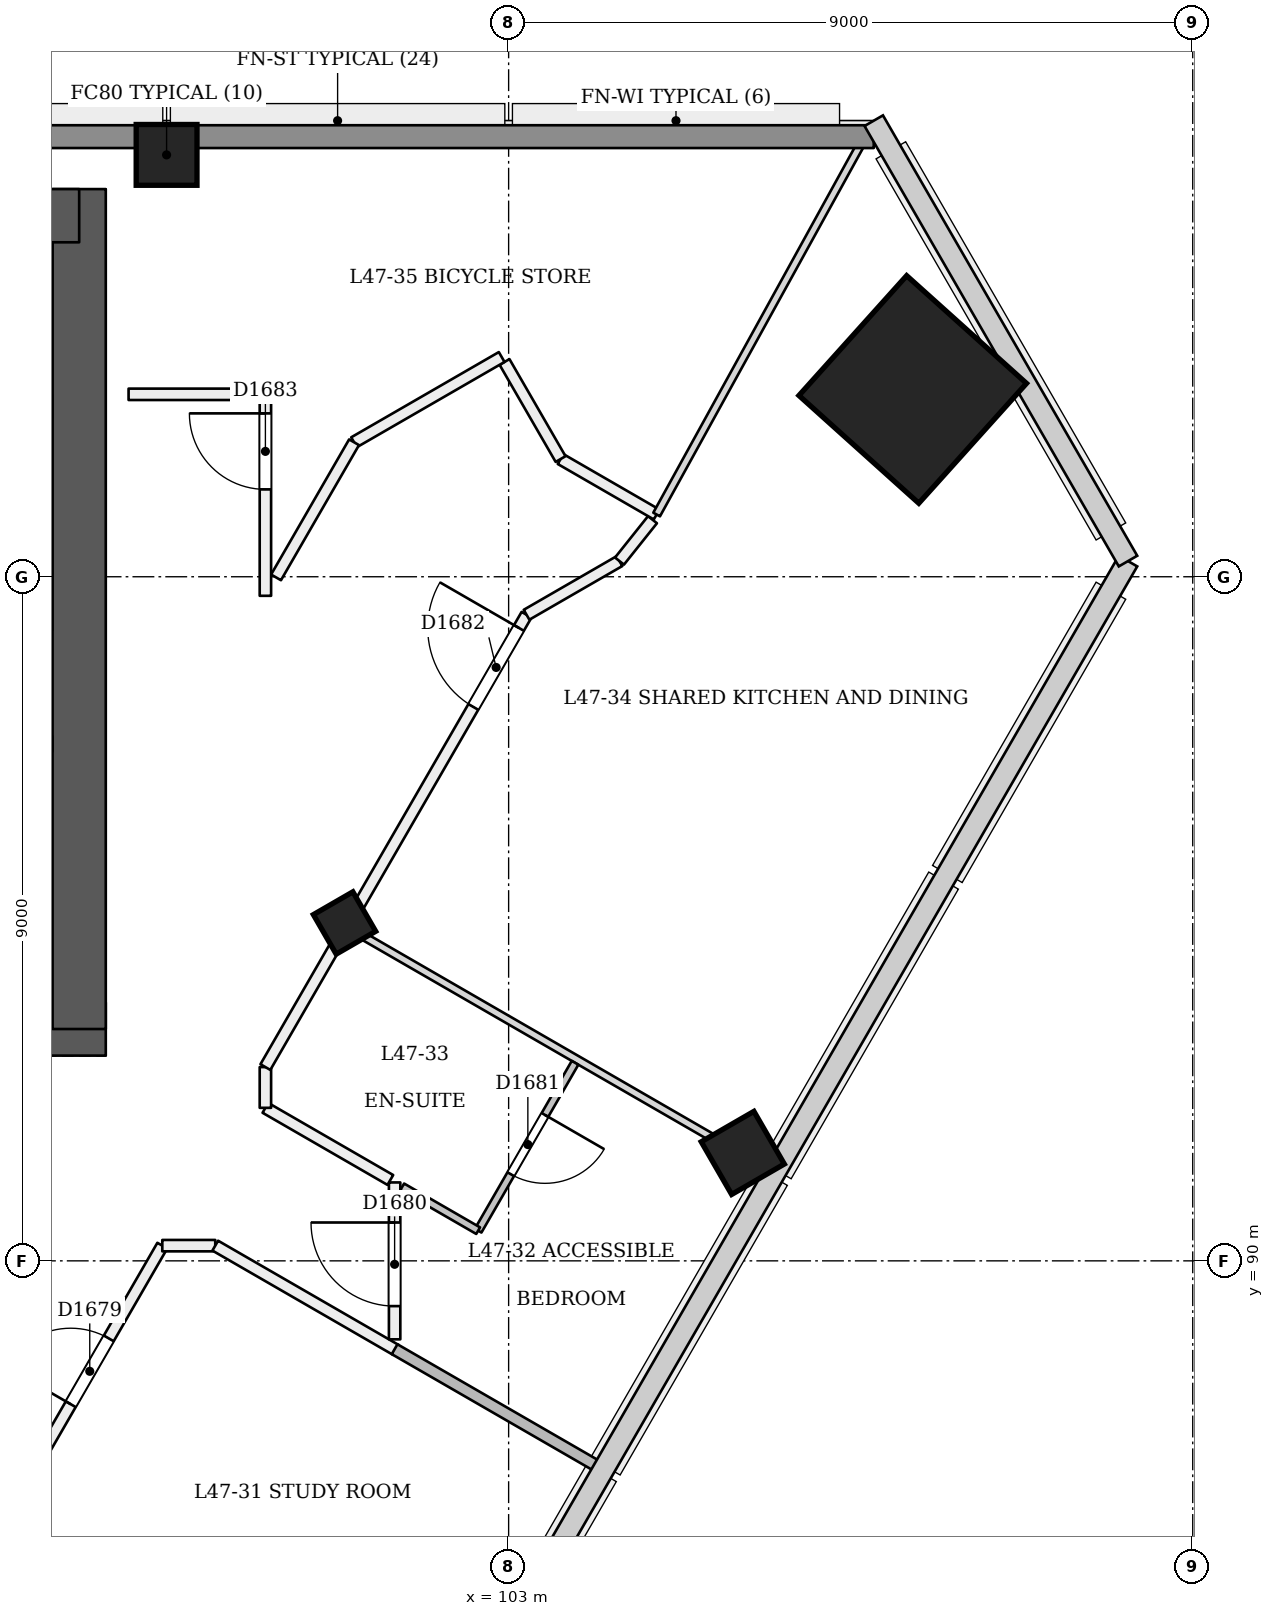
"""IFC4 building model, lengths in metres.
Left out: names, types, materials, properties, quantities, classifications, styles, units other than length and angle.
Written with IfcOpenShell. Run it as: python <this file> out.ifc"""

import sys

from ifc_helpers import new_model, si_unit, direction, frame, frame_2d, origin, origin_2d, place, context, subcontext, project, spatial, rectangle, extrude, element, fill, save


model = new_model("IFC4")
c1 = context("Model", 3, precision=1e-05, world=origin(), true_north=direction((0.0, 1.0)))
c2 = subcontext(c1, "Body", "Model", "MODEL_VIEW")
j1 = project(units=[si_unit("LENGTHUNIT", "METRE"), si_unit("PLANEANGLEUNIT", "RADIAN")], contexts=[c1])
p1 = place(None, origin())
s1 = spatial("IfcSite", under=j1, at=p1, CompositionType="ELEMENT")
p2 = place(p1, origin())
s2 = spatial("IfcBuilding", under=s1, at=p2, CompositionType="ELEMENT")
p3 = place(p2, frame((0.0, 0.0, 181.8)))
s3 = spatial("IfcBuildingStorey", under=s2, at=p3, CompositionType="ELEMENT", Elevation=181.8)
p4 = place(p3, frame((72.65, 93.05, 0.0), z_axis=(0.0, 0.0, 1.0), x_axis=(1.0, 0.0, 0.0)))
e1 = element("IfcWall", 1, at=p4, inside=s3, PredefinedType="SHEAR", context=c2, shape_type="SweptSolid", body=[
    extrude(rectangle(XDim=25.05, YDim=0.7, at=frame_2d((12.525, 0.0))), origin(), (0.0, 0.0, 1.0), 3.6),
])
p5 = place(p4, frame((1.15, 0.0, 0.0)))
e2 = element("IfcOpeningElement", 2, at=p5, cuts=e1, PredefinedType="OPENING", context=c2, shape_type="SweptSolid", body=[
    extrude(rectangle(XDim=1.2, YDim=2.1, at=frame_2d((0.6, 1.05))), frame((0.0, 0.36, 0.0), z_axis=(0.0, -1.0, 0.0), x_axis=(1.0, 0.0, 0.0)), (0.0, 0.0, 1.0), 0.721),
])
p6 = place(p4, frame((3.35, 0.0, 0.0)))
e3 = element("IfcOpeningElement", 3, at=p6, cuts=e1, PredefinedType="OPENING", context=c2, shape_type="SweptSolid", body=[
    extrude(rectangle(XDim=1.2, YDim=2.1, at=frame_2d((0.6, 1.05))), frame((0.0, 0.36, 0.0), z_axis=(0.0, -1.0, 0.0), x_axis=(1.0, 0.0, 0.0)), (0.0, 0.0, 1.0), 0.721),
])
p7 = place(p4, frame((13.35, 0.0, 0.0)))
e4 = element("IfcOpeningElement", 4, at=p7, cuts=e1, PredefinedType="OPENING", context=c2, shape_type="SweptSolid", body=[
    extrude(rectangle(XDim=1.2, YDim=2.1, at=frame_2d((0.6, 1.05))), frame((0.0, 0.36, 0.0), z_axis=(0.0, -1.0, 0.0), x_axis=(1.0, 0.0, 0.0)), (0.0, 0.0, 1.0), 0.721),
])
p8 = place(p4, frame((15.312, 0.0, 0.0)))
e5 = element("IfcOpeningElement", 5, at=p8, cuts=e1, PredefinedType="OPENING", context=c2, shape_type="SweptSolid", body=[
    extrude(rectangle(XDim=1.0, YDim=2.1, at=frame_2d((0.5, 1.05))), frame((0.0, 0.36, 0.0), z_axis=(0.0, -1.0, 0.0), x_axis=(1.0, 0.0, 0.0)), (0.0, 0.0, 1.0), 0.721),
])
p9 = place(p4, frame((18.15, 0.0, 0.0)))
e6 = element("IfcOpeningElement", 6, at=p9, cuts=e1, PredefinedType="OPENING", context=c2, shape_type="SweptSolid", body=[
    extrude(rectangle(XDim=1.0, YDim=2.1, at=frame_2d((0.5, 1.05))), frame((0.0, 0.36, 0.0), z_axis=(0.0, -1.0, 0.0), x_axis=(1.0, 0.0, 0.0)), (0.0, 0.0, 1.0), 0.721),
])
p10 = place(p4, frame((21.05, 0.0, 0.0)))
e7 = element("IfcOpeningElement", 7, at=p10, cuts=e1, PredefinedType="OPENING", context=c2, shape_type="SweptSolid", body=[
    extrude(rectangle(XDim=1.0, YDim=2.1, at=frame_2d((0.5, 1.05))), frame((0.0, 0.36, 0.0), z_axis=(0.0, -1.0, 0.0), x_axis=(1.0, 0.0, 0.0)), (0.0, 0.0, 1.0), 0.721),
])
p11 = place(p4, frame((22.938, 0.0, 0.0)))
e8 = element("IfcOpeningElement", 8, at=p11, cuts=e1, PredefinedType="OPENING", context=c2, shape_type="SweptSolid", body=[
    extrude(rectangle(XDim=1.0, YDim=2.1, at=frame_2d((0.5, 1.05))), frame((0.0, 0.36, 0.0), z_axis=(0.0, -1.0, 0.0), x_axis=(1.0, 0.0, 0.0)), (0.0, 0.0, 1.0), 0.721),
])
p12 = place(p3, frame((97.35, 93.05, 0.0), z_axis=(0.0, 0.0, 1.0), x_axis=(0.0, 1.0, 0.0)))
e9 = element("IfcWall", 9, at=p12, inside=s3, PredefinedType="SHEAR", context=c2, shape_type="SweptSolid", body=[
    extrude(rectangle(XDim=11.05, YDim=0.7, at=frame_2d((5.525, 0.0))), origin(), (0.0, 0.0, 1.0), 3.6),
])
p13 = place(p3, frame((97.35, 103.75, 0.0), z_axis=(0.0, 0.0, 1.0), x_axis=(-1.0, 0.0, 0.0)))
e10 = element("IfcWall", 10, at=p13, inside=s3, PredefinedType="SHEAR", context=c2, shape_type="SweptSolid", body=[
    extrude(rectangle(XDim=25.05, YDim=0.7, at=frame_2d((12.525, 0.0))), origin(), (0.0, 0.0, 1.0), 3.6),
])
p14 = place(p3, frame((100.868, 94.398, -0.018), z_axis=(-0.02215369191, 0.038413282303, 0.999016333038), x_axis=(-0.500654723088, -0.865363077154, 0.022171895449)))
e11 = element("IfcColumn", 11, at=p14, inside=s3, PredefinedType="COLUMN", context=c2, shape_type="SweptSolid", body=[
    extrude(rectangle(XDim=0.6, YDim=0.6, at=origin_2d()), origin(), (0.0, 0.0, 1.0), 3.604),
])
p15 = place(p3, frame((108.35, 101.453, 0.0), z_axis=(-0.028403739082, 0.009219352065, 0.999554016126), x_axis=(0.500767468669, -0.865296834365, 0.022211050447)))
e12 = element("IfcColumn", 12, at=p15, inside=s3, PredefinedType="COLUMN", context=c2, shape_type="SweptSolid", body=[
    extrude(rectangle(XDim=2.12, YDim=2.12, at=origin_2d()), origin(), (0.0, 0.0, 1.0), 3.602),
])
p16 = place(p3, frame((98.5, 104.55, 0.0), z_axis=(0.0, 0.0, 1.0), x_axis=(1.0, 0.0, 0.0)))
e13 = element("IfcColumn", 13, at=p16, inside=s3, PredefinedType="COLUMN", context=c2, shape_type="SweptSolid", body=[
    extrude(rectangle(XDim=0.8, YDim=0.8, at=origin_2d()), origin(), (0.0, 0.0, 1.0), 3.6),
])
p17 = place(p3, frame((106.108, 91.373, -0.024), z_axis=(-0.02222134892, 0.038480872521, 0.999012229206), x_axis=(-0.500171903671, -0.86564104797, 0.022218074789)))
e14 = element("IfcColumn", 14, at=p17, inside=s3, PredefinedType="COLUMN", context=c2, shape_type="SweptSolid", body=[
    extrude(rectangle(XDim=0.8, YDim=0.8, at=origin_2d()), origin(), (0.0, 0.0, 1.0), 3.604),
])
p18 = place(p3, frame((85.033, 66.972, 0.0), z_axis=(0.0, 0.0, 1.0), x_axis=(0.500001115073, 0.866024759996, 0.0)))
e15 = element("IfcWall", 15, at=p18, inside=s3, PredefinedType="PARTITIONING", context=c2, shape_type="SweptSolid", body=[
    extrude(rectangle(XDim=26.822, YDim=0.15, at=frame_2d((13.411, 0.0))), origin(), (0.0, 0.0, 1.0), 2.75),
])
p19 = place(p18, frame((0.527, 0.0, 0.0)))
e16 = element("IfcOpeningElement", 16, at=p19, cuts=e15, PredefinedType="OPENING", context=c2, shape_type="SweptSolid", body=[
    extrude(rectangle(XDim=1.2, YDim=2.1, at=frame_2d((0.6, 1.05))), frame((0.0, 0.085, 0.0), z_axis=(0.0, -1.0, 0.0), x_axis=(1.0, 0.0, 0.0)), (0.0, 0.0, 1.0), 0.171),
])
p20 = place(p18, frame((7.566, 0.0, 0.0)))
e17 = element("IfcOpeningElement", 17, at=p20, cuts=e15, PredefinedType="OPENING", context=c2, shape_type="SweptSolid", body=[
    extrude(rectangle(XDim=1.0, YDim=2.1, at=frame_2d((0.5, 1.05))), frame((0.0, 0.085, 0.0), z_axis=(0.0, -1.0, 0.0), x_axis=(1.0, 0.0, 0.0)), (0.0, 0.0, 1.0), 0.171),
])
p21 = place(p18, frame((9.891, 0.0, 0.0)))
e18 = element("IfcOpeningElement", 18, at=p21, cuts=e15, PredefinedType="OPENING", context=c2, shape_type="SweptSolid", body=[
    extrude(rectangle(XDim=1.0, YDim=2.1, at=frame_2d((0.5, 1.05))), frame((0.0, 0.085, 0.0), z_axis=(0.0, -1.0, 0.0), x_axis=(1.0, 0.0, 0.0)), (0.0, 0.0, 1.0), 0.171),
])
p22 = place(p18, frame((16.45, 0.0, 0.0)))
e19 = element("IfcOpeningElement", 19, at=p22, cuts=e15, PredefinedType="OPENING", context=c2, shape_type="SweptSolid", body=[
    extrude(rectangle(XDim=1.0, YDim=2.1, at=frame_2d((0.5, 1.05))), frame((0.0, 0.085, 0.0), z_axis=(0.0, -1.0, 0.0), x_axis=(1.0, 0.0, 0.0)), (0.0, 0.0, 1.0), 0.171),
])
p23 = place(p18, frame((18.891, 0.0, 0.0)))
e20 = element("IfcOpeningElement", 20, at=p23, cuts=e15, PredefinedType="OPENING", context=c2, shape_type="SweptSolid", body=[
    extrude(rectangle(XDim=1.0, YDim=2.1, at=frame_2d((0.5, 1.05))), frame((0.0, 0.085, 0.0), z_axis=(0.0, -1.0, 0.0), x_axis=(1.0, 0.0, 0.0)), (0.0, 0.0, 1.0), 0.171),
])
p24 = place(p18, frame((24.413, 0.0, 0.0)))
e21 = element("IfcOpeningElement", 21, at=p24, cuts=e15, PredefinedType="OPENING", context=c2, shape_type="SweptSolid", body=[
    extrude(rectangle(XDim=1.0, YDim=2.1, at=frame_2d((0.5, 1.05))), frame((0.0, 0.085, 0.0), z_axis=(0.0, -1.0, 0.0), x_axis=(1.0, 0.0, 0.0)), (0.0, 0.0, 1.0), 0.171),
])
p25 = place(p3, frame((98.444, 90.2, 0.0), z_axis=(0.0, 0.0, 1.0), x_axis=(1.0, 0.0, 0.0)))
e22 = element("IfcWall", 22, at=p25, inside=s3, PredefinedType="PARTITIONING", context=c2, shape_type="SweptSolid", body=[
    extrude(rectangle(XDim=0.697, YDim=0.15, at=frame_2d((0.348, 0.0))), origin(), (0.0, 0.0, 1.0), 3.15),
])
p26 = place(p3, frame((99.14, 90.2, 0.0), z_axis=(0.0, 0.0, 1.0), x_axis=(0.866028570666, -0.499994514761, 0.0)))
e23 = element("IfcWall", 23, at=p26, inside=s3, PredefinedType="PARTITIONING", context=c2, shape_type="SweptSolid", body=[
    extrude(rectangle(XDim=2.745, YDim=0.15, at=frame_2d((1.372, 0.0))), origin(), (0.0, 0.0, 1.0), 3.15),
])
p27 = place(p3, frame((101.5, 88.968, 0.0), z_axis=(0.0, 0.0, 1.0), x_axis=(0.0, 1.0, 0.0)))
e24 = element("IfcWall", 24, at=p27, inside=s3, PredefinedType="PARTITIONING", context=c2, shape_type="SweptSolid", body=[
    extrude(rectangle(XDim=2.064, YDim=0.15, at=frame_2d((1.032, 0.0))), origin(), (0.0, 0.0, 1.0), 3.15),
])
p28 = place(p27, frame((0.437, 0.0, 0.0)))
e25 = element("IfcOpeningElement", 25, at=p28, cuts=e24, PredefinedType="OPENING", context=c2, shape_type="SweptSolid", body=[
    extrude(rectangle(XDim=1.1, YDim=2.1, at=frame_2d((0.55, 1.05))), frame((0.0, 0.085, 0.0), z_axis=(0.0, -1.0, 0.0), x_axis=(1.0, 0.0, 0.0)), (0.0, 0.0, 1.0), 0.171),
])
p29 = place(p3, frame((101.444, 91.064, 0.0), z_axis=(0.0, 0.0, 1.0), x_axis=(-0.866042076863, 0.499971120268, 0.0)))
e26 = element("IfcWall", 26, at=p29, inside=s3, PredefinedType="PARTITIONING", context=c2, shape_type="SweptSolid", body=[
    extrude(rectangle(XDim=1.898, YDim=0.15, at=frame_2d((0.949, 0.0))), origin(), (0.0, 0.0, 1.0), 3.15),
])
p30 = place(p3, frame((99.8, 92.013, 0.0), z_axis=(0.0, 0.0, 1.0), x_axis=(0.0, 1.0, 0.0)))
e27 = element("IfcWall", 27, at=p30, inside=s3, PredefinedType="PARTITIONING", context=c2, shape_type="SweptSolid", body=[
    extrude(rectangle(XDim=0.536, YDim=0.15, at=frame_2d((0.268, 0.0))), origin(), (0.0, 0.0, 1.0), 3.15),
])
p31 = place(p3, frame((99.8, 92.549, 0.0), z_axis=(0.0, 0.0, 1.0), x_axis=(0.49999106054, 0.866030564923, 0.0)))
e28 = element("IfcWall", 28, at=p31, inside=s3, PredefinedType="PARTITIONING", context=c2, shape_type="SweptSolid", body=[
    extrude(rectangle(XDim=6.871, YDim=0.15, at=frame_2d((3.436, 0.0))), origin(), (0.0, 0.0, 1.0), 2.75),
])
p32 = place(p31, frame((5.471, 0.0, 0.0)))
e29 = element("IfcOpeningElement", 29, at=p32, cuts=e28, PredefinedType="OPENING", context=c2, shape_type="SweptSolid", body=[
    extrude(rectangle(XDim=1.2, YDim=2.1, at=frame_2d((0.6, 1.05))), frame((0.0, 0.085, 0.0), z_axis=(0.0, -1.0, 0.0), x_axis=(1.0, 0.0, 0.0)), (0.0, 0.0, 1.0), 0.171),
])
p33 = place(p3, frame((103.236, 98.5, 0.0), z_axis=(0.0, 0.0, 1.0), x_axis=(0.866021473228, 0.500006807861, 0.0)))
e30 = element("IfcWall", 30, at=p33, inside=s3, PredefinedType="PARTITIONING", context=c2, shape_type="SweptSolid", body=[
    extrude(rectangle(XDim=1.412, YDim=0.15, at=frame_2d((0.706, 0.0))), origin(), (0.0, 0.0, 1.0), 3.15),
])
p34 = place(p3, frame((104.458, 99.206, 0.0), z_axis=(0.0, 0.0, 1.0), x_axis=(0.623454855773, 0.781859349764, 0.0)))
e31 = element("IfcWall", 31, at=p34, inside=s3, PredefinedType="PARTITIONING", context=c2, shape_type="SweptSolid", body=[
    extrude(rectangle(XDim=0.697, YDim=0.15, at=frame_2d((0.348, 0.0))), origin(), (0.0, 0.0, 1.0), 3.15),
])
p35 = place(p3, frame((104.947, 99.819, 0.0), z_axis=(0.0, 0.0, 1.0), x_axis=(-0.866010015463, 0.500026652407, 0.0)))
e32 = element("IfcWall", 32, at=p35, inside=s3, PredefinedType="PARTITIONING", context=c2, shape_type="SweptSolid", body=[
    extrude(rectangle(XDim=1.459, YDim=0.15, at=frame_2d((0.729, 0.0))), origin(), (0.0, 0.0, 1.0), 3.15),
])
p36 = place(p3, frame((103.684, 100.548, 0.0), z_axis=(0.0, 0.0, 1.0), x_axis=(-0.500037662692, 0.866003658127, 0.0)))
e33 = element("IfcWall", 33, at=p36, inside=s3, PredefinedType="PARTITIONING", context=c2, shape_type="SweptSolid", body=[
    extrude(rectangle(XDim=1.475, YDim=0.15, at=frame_2d((0.738, 0.0))), origin(), (0.0, 0.0, 1.0), 3.15),
])
p37 = place(p3, frame((102.908, 101.891, 0.0), z_axis=(0.0, 0.0, 1.0), x_axis=(-0.866016984105, -0.500014583029, 0.0)))
e34 = element("IfcWall", 34, at=p37, inside=s3, PredefinedType="PARTITIONING", context=c2, shape_type="SweptSolid", body=[
    extrude(rectangle(XDim=2.243, YDim=0.15, at=frame_2d((1.121, 0.0))), origin(), (0.0, 0.0, 1.0), 3.15),
])
p38 = place(p3, frame((100.966, 100.769, 0.0), z_axis=(0.0, 0.0, 1.0), x_axis=(-0.500027893485, -0.866009298874, 0.0)))
e35 = element("IfcWall", 35, at=p38, inside=s3, PredefinedType="PARTITIONING", context=c2, shape_type="SweptSolid", body=[
    extrude(rectangle(XDim=2.053, YDim=0.15, at=frame_2d((1.026, 0.0))), origin(), (0.0, 0.0, 1.0), 3.15),
])
p39 = place(p3, frame((99.8, 98.749, 0.0), z_axis=(0.0, 0.0, 1.0), x_axis=(0.0, 1.0, 0.0)))
e36 = element("IfcWall", 36, at=p39, inside=s3, PredefinedType="PARTITIONING", context=c2, shape_type="SweptSolid", body=[
    extrude(rectangle(XDim=2.651, YDim=0.15, at=frame_2d((1.325, 0.0))), origin(), (0.0, 0.0, 1.0), 3.15),
])
p40 = place(p39, frame((1.4, 0.0, 0.0)))
e37 = element("IfcOpeningElement", 37, at=p40, cuts=e36, PredefinedType="OPENING", context=c2, shape_type="SweptSolid", body=[
    extrude(rectangle(XDim=1.0, YDim=2.1, at=frame_2d((0.5, 1.05))), frame((0.0, 0.085, 0.0), z_axis=(0.0, -1.0, 0.0), x_axis=(1.0, 0.0, 0.0)), (0.0, 0.0, 1.0), 0.171),
])
p41 = place(p3, frame((99.725, 101.4, 0.0), z_axis=(0.0, 0.0, 1.0), x_axis=(-1.0, 0.0, 0.0)))
e38 = element("IfcWall", 38, at=p41, inside=s3, PredefinedType="PARTITIONING", context=c2, shape_type="SweptSolid", body=[
    extrude(rectangle(XDim=1.725, YDim=0.15, at=frame_2d((0.863, 0.0))), origin(), (0.0, 0.0, 1.0), 3.15),
])
p42 = place(p3, frame((98.862, 85.165, 0.0), z_axis=(0.0, 0.0, 1.0), x_axis=(-0.866011654119, 0.500023814363, 0.0)))
e39 = element("IfcWall", 39, at=p42, inside=s3, PredefinedType="PARTITIONING", context=c2, shape_type="SweptSolid", body=[
    extrude(rectangle(XDim=2.805, YDim=0.1, at=frame_2d((1.402, 0.0))), origin(), (0.0, 0.0, 1.0), 2.75),
])
p43 = place(p3, frame((104.178, 87.292, 0.0), z_axis=(0.0, 0.0, 1.0), x_axis=(-0.866023868869, 0.500002658542, 0.0)))
e40 = element("IfcWall", 40, at=p43, inside=s3, PredefinedType="PARTITIONING", context=c2, shape_type="SweptSolid", body=[
    extrude(rectangle(XDim=3.092, YDim=0.15, at=frame_2d((1.546, 0.0))), origin(), (0.0, 0.0, 1.0), 2.65),
])
p44 = place(p3, frame((103.874, 92.605, 0.0), z_axis=(0.0, 0.0, 1.0), x_axis=(-0.500062241894, -0.865989465428, 0.0)))
e41 = element("IfcWall", 41, at=p44, inside=s3, PredefinedType="PARTITIONING", context=c2, shape_type="SweptSolid", body=[
    extrude(rectangle(XDim=2.55, YDim=0.1, at=frame_2d((1.275, 0.0))), origin(), (0.0, 0.0, 1.0), 2.75),
])
p45 = place(p44, frame((0.792, 0.0, 0.0)))
e42 = element("IfcOpeningElement", 42, at=p45, cuts=e41, PredefinedType="OPENING", context=c2, shape_type="SweptSolid", body=[
    extrude(rectangle(XDim=0.9, YDim=2.1, at=frame_2d((0.45, 1.05))), frame((0.0, 0.061, 0.0), z_axis=(0.0, -1.0, 0.0), x_axis=(1.0, 0.0, 0.0)), (0.0, 0.0, 1.0), 0.121),
])
p46 = place(p3, frame((102.599, 90.397, 0.0), z_axis=(0.0, 0.0, 1.0), x_axis=(-0.866019899421, 0.500009533716, 0.0)))
e43 = element("IfcWall", 43, at=p46, inside=s3, PredefinedType="PARTITIONING", context=c2, shape_type="SweptSolid", body=[
    extrude(rectangle(XDim=1.153, YDim=0.1, at=frame_2d((0.577, 0.0))), origin(), (0.0, 0.0, 1.0), 3.15),
])
p47 = place(p3, frame((106.41, 91.199, 0.0), z_axis=(0.0, 0.0, 1.0), x_axis=(-0.866015887322, 0.500016482634, 0.0)))
e44 = element("IfcWall", 44, at=p47, inside=s3, PredefinedType="PARTITIONING", context=c2, shape_type="SweptSolid", body=[
    extrude(rectangle(XDim=6.325, YDim=0.1, at=frame_2d((3.163, 0.0))), origin(), (0.0, 0.0, 1.0), 2.65),
])
p48 = place(p3, frame((107.747, 104.898, 0.0), z_axis=(0.0, 0.0, 1.0), x_axis=(-0.482834728754, -0.875711496275, 0.0)))
e45 = element("IfcWall", 45, at=p48, inside=s3, PredefinedType="PARTITIONING", context=c2, shape_type="SweptSolid", body=[
    extrude(rectangle(XDim=5.8, YDim=0.1, at=frame_2d((2.9, 0.0))), origin(), (0.0, 0.0, 1.0), 2.65),
])
p49 = place(p3, frame((62.196, 104.79, 0.0), z_axis=(0.0, 0.0, 1.0), x_axis=(1.0, 0.0, 0.0)))
e46 = element("IfcWall", 46, at=p49, inside=s3, PredefinedType="SOLIDWALL", context=c2, shape_type="SweptSolid", body=[
    extrude(rectangle(XDim=45.607, YDim=0.3, at=frame_2d((22.804, 0.0))), origin(), (0.0, 0.0, 1.0), 2.65),
])
p50 = place(p24, origin())
e47 = element("IfcDoor", 47, at=p50, inside=s3, OperationType="SINGLE_SWING_LEFT", PredefinedType="NOTDEFINED", context=c2, shape_type="SweptSolid", body=[
    extrude(rectangle(XDim=1.0, YDim=2.1, at=frame_2d((0.5, 1.05))), frame((0.0, 0.025, 0.0), z_axis=(0.0, -1.0, 0.0), x_axis=(1.0, 0.0, 0.0)), (0.0, 0.0, 1.0), 0.05),
])
fill(e21, e47)
p51 = place(p28, origin())
e48 = element("IfcDoor", 48, at=p51, inside=s3, OperationType="SINGLE_SWING_RIGHT", PredefinedType="NOTDEFINED", context=c2, shape_type="SweptSolid", body=[
    extrude(rectangle(XDim=1.1, YDim=2.1, at=frame_2d((0.55, 1.05))), frame((0.0, 0.025, 0.0), z_axis=(0.0, -1.0, 0.0), x_axis=(1.0, 0.0, 0.0)), (0.0, 0.0, 1.0), 0.05),
])
fill(e25, e48)
p52 = place(p45, origin())
e49 = element("IfcDoor", 49, at=p52, inside=s3, OperationType="SINGLE_SWING_LEFT", PredefinedType="NOTDEFINED", context=c2, shape_type="SweptSolid", body=[
    extrude(rectangle(XDim=0.9, YDim=2.1, at=frame_2d((0.45, 1.05))), frame((0.0, 0.025, 0.0), z_axis=(0.0, -1.0, 0.0), x_axis=(1.0, 0.0, 0.0)), (0.0, 0.0, 1.0), 0.05),
])
fill(e42, e49)
p53 = place(p32, origin())
e50 = element("IfcDoor", 50, at=p53, inside=s3, OperationType="SINGLE_SWING_RIGHT", PredefinedType="NOTDEFINED", context=c2, shape_type="SweptSolid", body=[
    extrude(rectangle(XDim=1.2, YDim=2.1, at=frame_2d((0.6, 1.05))), frame((0.0, 0.025, 0.0), z_axis=(0.0, -1.0, 0.0), x_axis=(1.0, 0.0, 0.0)), (0.0, 0.0, 1.0), 0.05),
])
fill(e29, e50)
p54 = place(p40, origin())
e51 = element("IfcDoor", 51, at=p54, inside=s3, OperationType="SINGLE_SWING_RIGHT", PredefinedType="NOTDEFINED", context=c2, shape_type="SweptSolid", body=[
    extrude(rectangle(XDim=1.0, YDim=2.1, at=frame_2d((0.5, 1.05))), frame((0.0, 0.025, 0.0), z_axis=(0.0, -1.0, 0.0), x_axis=(1.0, 0.0, 0.0)), (0.0, 0.0, 1.0), 0.05),
])
fill(e37, e51)
save(model, sys.argv[1])
